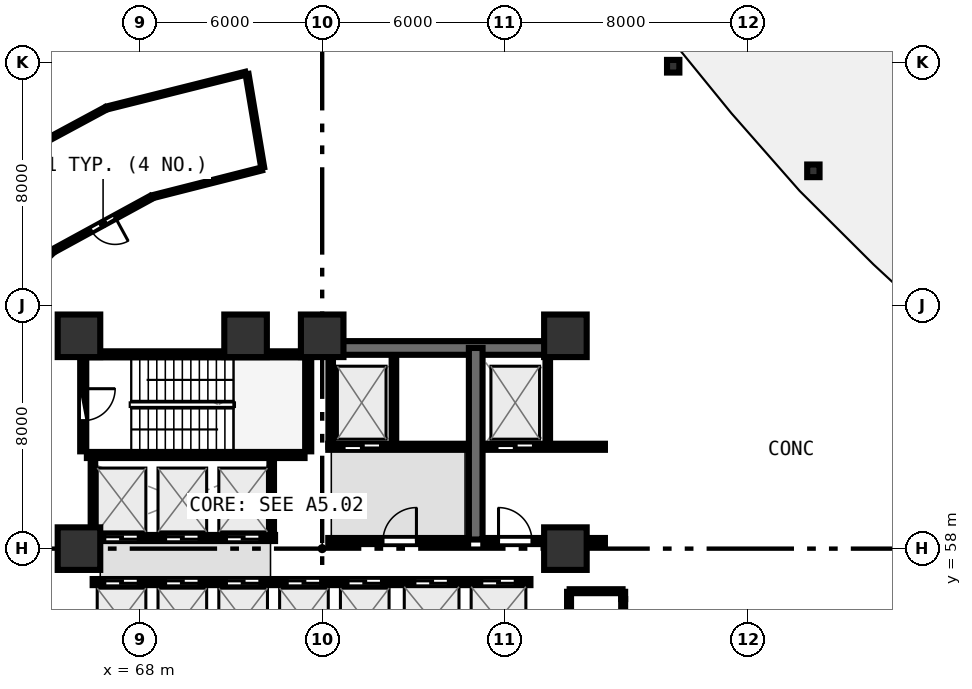
"""IFC4 building model, lengths in metres.
Left out: names, types, materials, properties, quantities, classifications, styles, units other than length and angle.
Written with IfcOpenShell. Run it as: python <this file> out.ifc"""

import sys

from ifc_helpers import new_model, si_unit, direction, frame, frame_2d, origin, origin_2d, place, context, subcontext, project, spatial, rectangle, i_section, extrude, element, fill, save


model = new_model("IFC4")
c1 = context("Model", 3, precision=1e-05, world=origin(), true_north=direction((0.0, 1.0)))
c2 = subcontext(c1, "Body", "Model", "MODEL_VIEW")
j1 = project(units=[si_unit("LENGTHUNIT", "METRE"), si_unit("PLANEANGLEUNIT", "RADIAN")], contexts=[c1])
p1 = place(None, origin())
s1 = spatial("IfcSite", under=j1, at=p1, CompositionType="ELEMENT")
p2 = place(p1, origin())
s2 = spatial("IfcBuilding", under=s1, at=p2, CompositionType="ELEMENT")
p3 = place(p2, origin())
s3 = spatial("IfcBuildingStorey", under=s2, at=p3, CompositionType="ELEMENT", Elevation=0.0)
for number, where, z_axis, x_axis in (
    (1, (82.0, 58.0, 0.0), (0.0, 0.0, 1.0), (1.0, 0.0, 0.0)),
    (2, (82.0, 65.0, 0.0), (0.0, 0.0, 1.0), (1.0, 0.0, 0.0)),
    (3, (74.0, 65.0, 0.0), (0.0, 0.0, 1.0), (1.0, 0.0, 0.0)),
    (4, (71.48, 65.0, 0.0), (0.0, 0.0, 1.0), (1.0, 0.0, 0.0)),
    (5, (66.0, 65.0, 0.0), (0.0, 0.0, 1.0), (1.0, 0.0, 0.0)),
    (6, (66.0, 58.0, 0.0), (0.0, 0.0, 1.0), (1.0, 0.0, 0.0)),
):
    element("IfcColumn", number, at=place(p3, frame(where, z_axis=z_axis, x_axis=x_axis)), inside=s3, PredefinedType="PILASTER", context=c2, shape_type="SweptSolid", body=[
        extrude(rectangle(XDim=1.4, YDim=1.4, at=origin_2d()), origin(), (0.0, 0.0, 1.0), 4.5),
    ])
for number, where, z_axis, x_axis in (
    (7, (90.156, 70.426, 0.0), (0.0, 0.0, 1.0), (1.0, 0.0, 0.0)),
    (8, (85.546, 73.866, 0.0), (0.0, 0.0, 1.0), (1.0, 0.0, 0.0)),
):
    element("IfcColumn", number, at=place(p3, frame(where, z_axis=z_axis, x_axis=x_axis)), inside=s3, PredefinedType="COLUMN", context=c2, shape_type="SweptSolid", body=[
        extrude(i_section(OverallWidth=0.406, OverallDepth=0.416, WebThickness=0.029, FlangeThickness=0.048, FilletRadius=0.015, at=origin_2d()), origin(), (0.0, 0.0, 1.0), 4.5),
    ])
p4 = place(p3, frame((66.26, 61.08, 0.0), z_axis=(0.0, 0.0, 1.0), x_axis=(1.0, 0.0, 0.0)))
e9 = element("IfcWall", 9, at=p4, inside=s3, PredefinedType="SHEAR", context=c2, shape_type="SweptSolid", body=[
    extrude(rectangle(XDim=7.16, YDim=0.2, at=frame_2d((3.58, 0.0))), origin(), (0.0, 0.0, 1.0), 4.2),
])
p5 = place(p3, frame((73.54, 61.2, 0.0), z_axis=(0.0, 0.0, 1.0), x_axis=(0.0, 1.0, 0.0)))
e10 = element("IfcWall", 10, at=p5, inside=s3, PredefinedType="SHEAR", context=c2, shape_type="SweptSolid", body=[
    extrude(rectangle(XDim=3.07, YDim=0.2, at=frame_2d((1.535, 0.0))), origin(), (0.0, 0.0, 1.0), 4.2),
])
p6 = place(p3, frame((73.42, 64.39, 0.0), z_axis=(0.0, 0.0, 1.0), x_axis=(-1.0, 0.0, 0.0)))
e11 = element("IfcWall", 11, at=p6, inside=s3, PredefinedType="SHEAR", context=c2, shape_type="SweptSolid", body=[
    extrude(rectangle(XDim=7.16, YDim=0.2, at=frame_2d((3.58, 0.0))), origin(), (0.0, 0.0, 1.0), 4.2),
])
p7 = place(p3, frame((66.14, 64.27, 0.0), z_axis=(0.0, 0.0, 1.0), x_axis=(0.0, -1.0, 0.0)))
e12 = element("IfcWall", 12, at=p7, inside=s3, PredefinedType="SHEAR", context=c2, shape_type="SweptSolid", body=[
    extrude(rectangle(XDim=3.07, YDim=0.2, at=frame_2d((1.535, 0.0))), origin(), (0.0, 0.0, 1.0), 4.2),
])
p8 = place(p7, frame((1.01, 0.0, 0.0)))
e13 = element("IfcOpeningElement", 13, at=p8, cuts=e12, PredefinedType="OPENING", context=c2, shape_type="SweptSolid", body=[
    extrude(rectangle(XDim=1.05, YDim=2.1, at=frame_2d((0.525, 1.05))), frame((0.0, 0.11, 0.0), z_axis=(0.0, -1.0, 0.0), x_axis=(1.0, 0.0, 0.0)), (0.0, 0.0, 1.0), 0.22),
])
p9 = place(p3, frame((74.0, 64.6, 0.0), z_axis=(0.0, 0.0, 1.0), x_axis=(1.0, 0.0, 0.0)))
e14 = element("IfcWall", 14, at=p9, inside=s3, PredefinedType="SHEAR", context=c2, shape_type="SweptSolid", body=[
    extrude(rectangle(XDim=8.0, YDim=0.45, at=frame_2d((4.0, 0.0))), origin(), (0.0, 0.0, 1.0), 4.2),
])
p10 = place(p3, frame((79.05, 58.3, 0.0), z_axis=(0.0, 0.0, 1.0), x_axis=(0.0, 1.0, 0.0)))
e15 = element("IfcWall", 15, at=p10, inside=s3, PredefinedType="SHEAR", context=c2, shape_type="SweptSolid", body=[
    extrude(rectangle(XDim=6.3, YDim=0.45, at=frame_2d((3.15, 0.0))), origin(), (0.0, 0.0, 1.0), 4.2),
])
p11 = place(p3, frame((74.2, 61.35, 0.0), z_axis=(0.0, 0.0, 1.0), x_axis=(1.0, 0.0, 0.0)))
e16 = element("IfcWall", 16, at=p11, inside=s3, PredefinedType="SOLIDWALL", context=c2, shape_type="SweptSolid", body=[
    extrude(rectangle(XDim=4.6, YDim=0.2, at=frame_2d((2.3, 0.0))), origin(), (0.0, 0.0, 1.0), 4.19),
])
p12 = place(p11, frame((0.52, 0.0, 0.0)))
e17 = element("IfcOpeningElement", 17, at=p12, cuts=e16, PredefinedType="OPENING", context=c2, shape_type="SweptSolid", body=[
    extrude(rectangle(XDim=1.2, YDim=2.15, at=frame_2d((0.6, 1.075))), frame((0.0, 0.11, 0.0), z_axis=(0.0, -1.0, 0.0), x_axis=(1.0, 0.0, 0.0)), (0.0, 0.0, 1.0), 0.22),
])
p13 = place(p3, frame((74.28, 61.35, 0.0), z_axis=(0.0, 0.0, 1.0), x_axis=(0.0, 1.0, 0.0)))
e18 = element("IfcWall", 18, at=p13, inside=s3, PredefinedType="PARTITIONING", context=c2, shape_type="SweptSolid", body=[
    extrude(rectangle(XDim=2.97, YDim=0.15, at=frame_2d((1.485, 0.0))), origin(), (0.0, 0.0, 1.0), 4.19),
])
p14 = place(p3, frame((76.36, 61.48, 0.0), z_axis=(0.0, 0.0, 1.0), x_axis=(0.0, 1.0, 0.0)))
e19 = element("IfcWall", 19, at=p14, inside=s3, PredefinedType="PARTITIONING", context=c2, shape_type="SweptSolid", body=[
    extrude(rectangle(XDim=2.84, YDim=0.15, at=frame_2d((1.42, 0.0))), origin(), (0.0, 0.0, 1.0), 4.19),
])
p15 = place(p3, frame((79.3, 61.35, 0.0), z_axis=(0.0, 0.0, 1.0), x_axis=(1.0, 0.0, 0.0)))
e20 = element("IfcWall", 20, at=p15, inside=s3, PredefinedType="SOLIDWALL", context=c2, shape_type="SweptSolid", body=[
    extrude(rectangle(XDim=4.0, YDim=0.2, at=frame_2d((2.0, 0.0))), origin(), (0.0, 0.0, 1.0), 3.485),
])
p16 = place(p15, frame((0.45, 0.0, 0.0)))
e21 = element("IfcOpeningElement", 21, at=p16, cuts=e20, PredefinedType="OPENING", context=c2, shape_type="SweptSolid", body=[
    extrude(rectangle(XDim=1.2, YDim=2.15, at=frame_2d((0.6, 1.075))), frame((0.0, 0.11, 0.0), z_axis=(0.0, -1.0, 0.0), x_axis=(1.0, 0.0, 0.0)), (0.0, 0.0, 1.0), 0.22),
])
p17 = place(p3, frame((81.42, 61.48, 0.0), z_axis=(0.0, 0.0, 1.0), x_axis=(0.0, 1.0, 0.0)))
e22 = element("IfcWall", 22, at=p17, inside=s3, PredefinedType="PARTITIONING", context=c2, shape_type="SweptSolid", body=[
    extrude(rectangle(XDim=2.84, YDim=0.15, at=frame_2d((1.42, 0.0))), origin(), (0.0, 0.0, 1.0), 4.19),
])
p18 = place(p3, frame((74.2, 58.25, 0.0), z_axis=(0.0, 0.0, 1.0), x_axis=(1.0, 0.0, 0.0)))
e23 = element("IfcWall", 23, at=p18, inside=s3, PredefinedType="SOLIDWALL", context=c2, shape_type="SweptSolid", body=[
    extrude(rectangle(XDim=4.6, YDim=0.2, at=frame_2d((2.3, 0.0))), origin(), (0.0, 0.0, 1.0), 4.19),
])
p19 = place(p18, frame((1.8, 0.0, 0.0)))
e24 = element("IfcOpeningElement", 24, at=p19, cuts=e23, PredefinedType="OPENING", context=c2, shape_type="SweptSolid", body=[
    extrude(rectangle(XDim=1.1, YDim=2.1, at=frame_2d((0.55, 1.05))), frame((0.0, 0.11, 0.0), z_axis=(0.0, -1.0, 0.0), x_axis=(1.0, 0.0, 0.0)), (0.0, 0.0, 1.0), 0.22),
])
p20 = place(p3, frame((79.3, 58.25, 0.0), z_axis=(0.0, 0.0, 1.0), x_axis=(1.0, 0.0, 0.0)))
e25 = element("IfcWall", 25, at=p20, inside=s3, PredefinedType="SOLIDWALL", context=c2, shape_type="SweptSolid", body=[
    extrude(rectangle(XDim=4.0, YDim=0.2, at=frame_2d((2.0, 0.0))), origin(), (0.0, 0.0, 1.0), 3.485),
])
p21 = place(p20, frame((0.5, 0.0, 0.0)))
e26 = element("IfcOpeningElement", 26, at=p21, cuts=e25, PredefinedType="OPENING", context=c2, shape_type="SweptSolid", body=[
    extrude(rectangle(XDim=1.1, YDim=2.1, at=frame_2d((0.55, 1.05))), frame((0.0, 0.11, 0.0), z_axis=(0.0, -1.0, 0.0), x_axis=(1.0, 0.0, 0.0)), (0.0, 0.0, 1.0), 0.22),
])
p22 = place(p3, frame((66.45, 58.35, 0.0), z_axis=(0.0, 0.0, 1.0), x_axis=(1.0, 0.0, 0.0)))
e27 = element("IfcWall", 27, at=p22, inside=s3, PredefinedType="SOLIDWALL", context=c2, shape_type="SweptSolid", body=[
    extrude(rectangle(XDim=6.0, YDim=0.2, at=frame_2d((3.0, 0.0))), origin(), (0.0, 0.0, 1.0), 4.19),
])
p23 = place(p22, frame((0.4, 0.0, 0.0)))
e28 = element("IfcOpeningElement", 28, at=p23, cuts=e27, PredefinedType="OPENING", context=c2, shape_type="SweptSolid", body=[
    extrude(rectangle(XDim=1.1, YDim=2.1, at=frame_2d((0.55, 1.05))), frame((0.0, 0.11, 0.0), z_axis=(0.0, -1.0, 0.0), x_axis=(1.0, 0.0, 0.0)), (0.0, 0.0, 1.0), 0.22),
])
p24 = place(p22, frame((2.4, 0.0, 0.0)))
e29 = element("IfcOpeningElement", 29, at=p24, cuts=e27, PredefinedType="OPENING", context=c2, shape_type="SweptSolid", body=[
    extrude(rectangle(XDim=1.1, YDim=2.1, at=frame_2d((0.55, 1.05))), frame((0.0, 0.11, 0.0), z_axis=(0.0, -1.0, 0.0), x_axis=(1.0, 0.0, 0.0)), (0.0, 0.0, 1.0), 0.22),
])
p25 = place(p22, frame((4.4, 0.0, 0.0)))
e30 = element("IfcOpeningElement", 30, at=p25, cuts=e27, PredefinedType="OPENING", context=c2, shape_type="SweptSolid", body=[
    extrude(rectangle(XDim=1.1, YDim=2.1, at=frame_2d((0.55, 1.05))), frame((0.0, 0.11, 0.0), z_axis=(0.0, -1.0, 0.0), x_axis=(1.0, 0.0, 0.0)), (0.0, 0.0, 1.0), 0.22),
])
for number, where, z_axis, x_axis in (
    (31, (66.46, 58.48, 0.0), (0.0, 0.0, 1.0), (0.0, 1.0, 0.0)),
    (32, (72.34, 58.48, 0.0), (0.0, 0.0, 1.0), (0.0, 1.0, 0.0)),
):
    element("IfcWall", number, at=place(p3, frame(where, z_axis=z_axis, x_axis=x_axis)), inside=s3, PredefinedType="PARTITIONING", context=c2, shape_type="SweptSolid", body=[
        extrude(rectangle(XDim=2.46, YDim=0.15, at=frame_2d((1.23, 0.0))), origin(), (0.0, 0.0, 1.0), 4.19),
    ])
p26 = place(p3, frame((66.45, 56.9, 0.0), z_axis=(0.0, 0.0, 1.0), x_axis=(1.0, 0.0, 0.0)))
e33 = element("IfcWall", 33, at=p26, inside=s3, PredefinedType="SOLIDWALL", context=c2, shape_type="SweptSolid", body=[
    extrude(rectangle(XDim=14.4, YDim=0.2, at=frame_2d((7.2, 0.0))), origin(), (0.0, 0.0, 1.0), 4.19),
])
p27 = place(p26, frame((0.4, 0.0, 0.0)))
e34 = element("IfcOpeningElement", 34, at=p27, cuts=e33, PredefinedType="OPENING", context=c2, shape_type="SweptSolid", body=[
    extrude(rectangle(XDim=1.1, YDim=2.1, at=frame_2d((0.55, 1.05))), frame((0.0, 0.11, 0.0), z_axis=(0.0, -1.0, 0.0), x_axis=(1.0, 0.0, 0.0)), (0.0, 0.0, 1.0), 0.22),
])
p28 = place(p26, frame((2.4, 0.0, 0.0)))
e35 = element("IfcOpeningElement", 35, at=p28, cuts=e33, PredefinedType="OPENING", context=c2, shape_type="SweptSolid", body=[
    extrude(rectangle(XDim=1.1, YDim=2.1, at=frame_2d((0.55, 1.05))), frame((0.0, 0.11, 0.0), z_axis=(0.0, -1.0, 0.0), x_axis=(1.0, 0.0, 0.0)), (0.0, 0.0, 1.0), 0.22),
])
p29 = place(p26, frame((4.4, 0.0, 0.0)))
e36 = element("IfcOpeningElement", 36, at=p29, cuts=e33, PredefinedType="OPENING", context=c2, shape_type="SweptSolid", body=[
    extrude(rectangle(XDim=1.1, YDim=2.1, at=frame_2d((0.55, 1.05))), frame((0.0, 0.11, 0.0), z_axis=(0.0, -1.0, 0.0), x_axis=(1.0, 0.0, 0.0)), (0.0, 0.0, 1.0), 0.22),
])
p30 = place(p26, frame((6.4, 0.0, 0.0)))
e37 = element("IfcOpeningElement", 37, at=p30, cuts=e33, PredefinedType="OPENING", context=c2, shape_type="SweptSolid", body=[
    extrude(rectangle(XDim=1.1, YDim=2.1, at=frame_2d((0.55, 1.05))), frame((0.0, 0.11, 0.0), z_axis=(0.0, -1.0, 0.0), x_axis=(1.0, 0.0, 0.0)), (0.0, 0.0, 1.0), 0.22),
])
p31 = place(p26, frame((8.4, 0.0, 0.0)))
e38 = element("IfcOpeningElement", 38, at=p31, cuts=e33, PredefinedType="OPENING", context=c2, shape_type="SweptSolid", body=[
    extrude(rectangle(XDim=1.1, YDim=2.1, at=frame_2d((0.55, 1.05))), frame((0.0, 0.11, 0.0), z_axis=(0.0, -1.0, 0.0), x_axis=(1.0, 0.0, 0.0)), (0.0, 0.0, 1.0), 0.22),
])
p32 = place(p26, frame((10.6, 0.0, 0.0)))
e39 = element("IfcOpeningElement", 39, at=p32, cuts=e33, PredefinedType="OPENING", context=c2, shape_type="SweptSolid", body=[
    extrude(rectangle(XDim=1.1, YDim=2.1, at=frame_2d((0.55, 1.05))), frame((0.0, 0.11, 0.0), z_axis=(0.0, -1.0, 0.0), x_axis=(1.0, 0.0, 0.0)), (0.0, 0.0, 1.0), 0.22),
])
p33 = place(p26, frame((12.8, 0.0, 0.0)))
e40 = element("IfcOpeningElement", 40, at=p33, cuts=e33, PredefinedType="OPENING", context=c2, shape_type="SweptSolid", body=[
    extrude(rectangle(XDim=1.1, YDim=2.1, at=frame_2d((0.55, 1.05))), frame((0.0, 0.11, 0.0), z_axis=(0.0, -1.0, 0.0), x_axis=(1.0, 0.0, 0.0)), (0.0, 0.0, 1.0), 0.22),
])
p34 = place(p3, frame((83.9, 52.46, 0.0), z_axis=(0.0, 0.0, 1.0), x_axis=(0.0, 1.0, 0.0)))
e41 = element("IfcWall", 41, at=p34, inside=s3, PredefinedType="PLUMBINGWALL", context=c2, shape_type="SweptSolid", body=[
    extrude(rectangle(XDim=3.88, YDim=0.13, at=frame_2d((1.94, 0.0))), origin(), (0.0, 0.0, 1.0), 4.19),
])
p35 = place(p34, frame((1.51, 0.0, 0.0)))
e42 = element("IfcOpeningElement", 42, at=p35, cuts=e41, PredefinedType="OPENING", context=c2, shape_type="SweptSolid", body=[
    extrude(rectangle(XDim=0.86, YDim=2.05, at=frame_2d((0.43, 1.025))), frame((0.0, 0.075, 0.0), z_axis=(0.0, -1.0, 0.0), x_axis=(1.0, 0.0, 0.0)), (0.0, 0.0, 1.0), 0.15),
])
p36 = place(p3, frame((68.357, 69.544, 0.0), z_axis=(0.0, 0.0, 1.0), x_axis=(-0.877746280932, -0.479125731212, 0.0)))
e43 = element("IfcWall", 43, at=p36, inside=s3, PredefinedType="PARTITIONING", context=c2, shape_type="SweptSolid", body=[
    extrude(rectangle(XDim=3.563, YDim=0.12, at=frame_2d((1.782, 0.0))), origin(), (0.0, 0.0, 1.0), 4.19),
])
p37 = place(p36, frame((1.332, 0.0, 0.0)))
e44 = element("IfcOpeningElement", 44, at=p37, cuts=e43, PredefinedType="OPENING", context=c2, shape_type="SweptSolid", body=[
    extrude(rectangle(XDim=0.9, YDim=2.08, at=frame_2d((0.45, 1.04))), frame((0.0, 0.07, 0.0), z_axis=(0.0, -1.0, 0.0), x_axis=(1.0, 0.0, 0.0)), (0.0, 0.0, 1.0), 0.14),
])
p38 = place(p3, frame((83.9, 56.34, 0.0), z_axis=(0.0, 0.0, 1.0), x_axis=(0.0, 1.0, 0.0)))
e45 = element("IfcWall", 45, at=p38, inside=s3, PredefinedType="PLUMBINGWALL", context=c2, shape_type="SweptSolid", body=[
    extrude(rectangle(XDim=0.24, YDim=0.13, at=frame_2d((0.12, 0.0))), origin(), (0.0, 0.0, 1.0), 4.19),
])
p39 = place(p3, frame((83.88, 56.6, 0.0), z_axis=(0.0, 0.0, 1.0), x_axis=(-1.0, 0.0, 0.0)))
e46 = element("IfcWall", 46, at=p39, inside=s3, PredefinedType="PLUMBINGWALL", context=c2, shape_type="SweptSolid", body=[
    extrude(rectangle(XDim=1.74, YDim=0.13, at=frame_2d((0.87, 0.0))), origin(), (0.0, 0.0, 1.0), 3.485),
])
p40 = place(p3, frame((82.12, 56.58, 0.0), z_axis=(0.0, 0.0, 1.0), x_axis=(0.0, -1.0, 0.0)))
e47 = element("IfcWall", 47, at=p40, inside=s3, PredefinedType="PLUMBINGWALL", context=c2, shape_type="SweptSolid", body=[
    extrude(rectangle(XDim=2.31, YDim=0.13, at=frame_2d((1.155, 0.0))), origin(), (0.0, 0.0, 1.0), 3.485),
])
p41 = place(p3, frame((72.01, 70.487, 0.0), z_axis=(0.0, 0.0, 1.0), x_axis=(-0.969229007952, -0.246160781085, 0.0)))
e48 = element("IfcWall", 48, at=p41, inside=s3, PredefinedType="PARTITIONING", context=c2, shape_type="SweptSolid", body=[
    extrude(rectangle(XDim=3.675, YDim=0.1, at=frame_2d((1.837, 0.0))), origin(), (0.0, 0.0, 1.0), 3.585),
])
p42 = place(p3, frame((65.148, 67.78, 0.0), z_axis=(0.0, 0.0, 1.0), x_axis=(-0.722428617801, -0.691445509192, 0.0)))
e49 = element("IfcWall", 49, at=p42, inside=s3, PredefinedType="PARTITIONING", context=c2, shape_type="SweptSolid", body=[
    extrude(rectangle(XDim=3.507, YDim=0.1, at=frame_2d((1.753, 0.0))), origin(), (0.0, 0.0, 1.0), 3.585),
])
p43 = place(p3, frame((62.833, 70.298, 0.0), z_axis=(0.0, 0.0, 1.0), x_axis=(0.880380395475, 0.474268235562, 0.0)))
e50 = element("IfcWall", 50, at=p43, inside=s3, PredefinedType="PARTITIONING", context=c2, shape_type="SweptSolid", body=[
    extrude(rectangle(XDim=4.582, YDim=0.1, at=frame_2d((2.291, 0.0))), origin(), (0.0, 0.0, 1.0), 3.585),
])
p44 = place(p3, frame((66.941, 72.5, 0.0), z_axis=(0.0, 0.0, 1.0), x_axis=(0.970108758835, 0.242670550399, 0.0)))
e51 = element("IfcWall", 51, at=p44, inside=s3, PredefinedType="PARTITIONING", context=c2, shape_type="SweptSolid", body=[
    extrude(rectangle(XDim=4.683, YDim=0.1, at=frame_2d((2.342, 0.0))), origin(), (0.0, 0.0, 1.0), 3.585),
])
p45 = place(p3, frame((71.53, 73.606, 0.0), z_axis=(0.0, 0.0, 1.0), x_axis=(0.164806022155, -0.98632599837, 0.0)))
e52 = element("IfcWall", 52, at=p45, inside=s3, PredefinedType="PARTITIONING", context=c2, shape_type="SweptSolid", body=[
    extrude(rectangle(XDim=3.112, YDim=0.1, at=frame_2d((1.556, 0.0))), origin(), (0.0, 0.0, 1.0), 3.945),
])
p46 = place(p8, origin())
e53 = element("IfcDoor", 53, at=p46, inside=s3, OperationType="SINGLE_SWING_LEFT", PredefinedType="DOOR", context=c2, shape_type="SweptSolid", body=[
    extrude(rectangle(XDim=1.05, YDim=2.1, at=frame_2d((0.525, 1.05))), frame((0.0, 0.025, 0.0), z_axis=(0.0, -1.0, 0.0), x_axis=(1.0, 0.0, 0.0)), (0.0, 0.0, 1.0), 0.05),
])
fill(e13, e53)
p47 = place(p12, origin())
e54 = element("IfcDoor", 54, at=p47, inside=s3, OperationType="DOUBLE_DOOR_SLIDING", PredefinedType="DOOR", context=c2, shape_type="SweptSolid", body=[
    extrude(rectangle(XDim=1.2, YDim=2.15, at=frame_2d((0.6, 1.075))), frame((0.0, 0.025, 0.0), z_axis=(0.0, -1.0, 0.0), x_axis=(1.0, 0.0, 0.0)), (0.0, 0.0, 1.0), 0.05),
])
fill(e17, e54)
p48 = place(p16, origin())
e55 = element("IfcDoor", 55, at=p48, inside=s3, OperationType="DOUBLE_DOOR_SLIDING", PredefinedType="DOOR", context=c2, shape_type="SweptSolid", body=[
    extrude(rectangle(XDim=1.2, YDim=2.15, at=frame_2d((0.6, 1.075))), frame((0.0, 0.025, 0.0), z_axis=(0.0, -1.0, 0.0), x_axis=(1.0, 0.0, 0.0)), (0.0, 0.0, 1.0), 0.05),
])
fill(e21, e55)
p49 = place(p19, frame((1.1, 0.0, 0.0), z_axis=(0.0, 0.0, 1.0), x_axis=(-1.0, 0.0, 0.0)))
e56 = element("IfcDoor", 56, at=p49, inside=s3, OperationType="SINGLE_SWING_LEFT", PredefinedType="DOOR", context=c2, shape_type="SweptSolid", body=[
    extrude(rectangle(XDim=1.1, YDim=2.1, at=frame_2d((0.55, 1.05))), frame((0.0, 0.025, 0.0), z_axis=(0.0, -1.0, 0.0), x_axis=(1.0, 0.0, 0.0)), (0.0, 0.0, 1.0), 0.05),
])
fill(e24, e56)
p50 = place(p21, frame((1.1, 0.0, 0.0), z_axis=(0.0, 0.0, 1.0), x_axis=(-1.0, 0.0, 0.0)))
e57 = element("IfcDoor", 57, at=p50, inside=s3, OperationType="SINGLE_SWING_RIGHT", PredefinedType="DOOR", context=c2, shape_type="SweptSolid", body=[
    extrude(rectangle(XDim=1.1, YDim=2.1, at=frame_2d((0.55, 1.05))), frame((0.0, 0.025, 0.0), z_axis=(0.0, -1.0, 0.0), x_axis=(1.0, 0.0, 0.0)), (0.0, 0.0, 1.0), 0.05),
])
fill(e26, e57)
p51 = place(p23, origin())
e58 = element("IfcDoor", 58, at=p51, inside=s3, OperationType="DOUBLE_DOOR_SLIDING", PredefinedType="DOOR", context=c2, shape_type="SweptSolid", body=[
    extrude(rectangle(XDim=1.1, YDim=2.1, at=frame_2d((0.55, 1.05))), frame((0.0, 0.025, 0.0), z_axis=(0.0, -1.0, 0.0), x_axis=(1.0, 0.0, 0.0)), (0.0, 0.0, 1.0), 0.05),
])
fill(e28, e58)
p52 = place(p24, origin())
e59 = element("IfcDoor", 59, at=p52, inside=s3, OperationType="DOUBLE_DOOR_SLIDING", PredefinedType="DOOR", context=c2, shape_type="SweptSolid", body=[
    extrude(rectangle(XDim=1.1, YDim=2.1, at=frame_2d((0.55, 1.05))), frame((0.0, 0.025, 0.0), z_axis=(0.0, -1.0, 0.0), x_axis=(1.0, 0.0, 0.0)), (0.0, 0.0, 1.0), 0.05),
])
fill(e29, e59)
p53 = place(p25, origin())
e60 = element("IfcDoor", 60, at=p53, inside=s3, OperationType="DOUBLE_DOOR_SLIDING", PredefinedType="DOOR", context=c2, shape_type="SweptSolid", body=[
    extrude(rectangle(XDim=1.1, YDim=2.1, at=frame_2d((0.55, 1.05))), frame((0.0, 0.025, 0.0), z_axis=(0.0, -1.0, 0.0), x_axis=(1.0, 0.0, 0.0)), (0.0, 0.0, 1.0), 0.05),
])
fill(e30, e60)
p54 = place(p27, origin())
e61 = element("IfcDoor", 61, at=p54, inside=s3, OperationType="DOUBLE_DOOR_SLIDING", PredefinedType="DOOR", context=c2, shape_type="SweptSolid", body=[
    extrude(rectangle(XDim=1.1, YDim=2.1, at=frame_2d((0.55, 1.05))), frame((0.0, 0.025, 0.0), z_axis=(0.0, -1.0, 0.0), x_axis=(1.0, 0.0, 0.0)), (0.0, 0.0, 1.0), 0.05),
])
fill(e34, e61)
p55 = place(p28, origin())
e62 = element("IfcDoor", 62, at=p55, inside=s3, OperationType="DOUBLE_DOOR_SLIDING", PredefinedType="DOOR", context=c2, shape_type="SweptSolid", body=[
    extrude(rectangle(XDim=1.1, YDim=2.1, at=frame_2d((0.55, 1.05))), frame((0.0, 0.025, 0.0), z_axis=(0.0, -1.0, 0.0), x_axis=(1.0, 0.0, 0.0)), (0.0, 0.0, 1.0), 0.05),
])
fill(e35, e62)
p56 = place(p29, origin())
e63 = element("IfcDoor", 63, at=p56, inside=s3, OperationType="DOUBLE_DOOR_SLIDING", PredefinedType="DOOR", context=c2, shape_type="SweptSolid", body=[
    extrude(rectangle(XDim=1.1, YDim=2.1, at=frame_2d((0.55, 1.05))), frame((0.0, 0.025, 0.0), z_axis=(0.0, -1.0, 0.0), x_axis=(1.0, 0.0, 0.0)), (0.0, 0.0, 1.0), 0.05),
])
fill(e36, e63)
p57 = place(p30, origin())
e64 = element("IfcDoor", 64, at=p57, inside=s3, OperationType="DOUBLE_DOOR_SLIDING", PredefinedType="DOOR", context=c2, shape_type="SweptSolid", body=[
    extrude(rectangle(XDim=1.1, YDim=2.1, at=frame_2d((0.55, 1.05))), frame((0.0, 0.025, 0.0), z_axis=(0.0, -1.0, 0.0), x_axis=(1.0, 0.0, 0.0)), (0.0, 0.0, 1.0), 0.05),
])
fill(e37, e64)
p58 = place(p31, origin())
e65 = element("IfcDoor", 65, at=p58, inside=s3, OperationType="DOUBLE_DOOR_SLIDING", PredefinedType="DOOR", context=c2, shape_type="SweptSolid", body=[
    extrude(rectangle(XDim=1.1, YDim=2.1, at=frame_2d((0.55, 1.05))), frame((0.0, 0.025, 0.0), z_axis=(0.0, -1.0, 0.0), x_axis=(1.0, 0.0, 0.0)), (0.0, 0.0, 1.0), 0.05),
])
fill(e38, e65)
p59 = place(p32, origin())
e66 = element("IfcDoor", 66, at=p59, inside=s3, OperationType="DOUBLE_DOOR_SLIDING", PredefinedType="DOOR", context=c2, shape_type="SweptSolid", body=[
    extrude(rectangle(XDim=1.1, YDim=2.1, at=frame_2d((0.55, 1.05))), frame((0.0, 0.025, 0.0), z_axis=(0.0, -1.0, 0.0), x_axis=(1.0, 0.0, 0.0)), (0.0, 0.0, 1.0), 0.05),
])
fill(e39, e66)
p60 = place(p33, origin())
e67 = element("IfcDoor", 67, at=p60, inside=s3, OperationType="DOUBLE_DOOR_SLIDING", PredefinedType="DOOR", context=c2, shape_type="SweptSolid", body=[
    extrude(rectangle(XDim=1.1, YDim=2.1, at=frame_2d((0.55, 1.05))), frame((0.0, 0.025, 0.0), z_axis=(0.0, -1.0, 0.0), x_axis=(1.0, 0.0, 0.0)), (0.0, 0.0, 1.0), 0.05),
])
fill(e40, e67)
p61 = place(p37, origin())
e68 = element("IfcDoor", 68, at=p61, inside=s3, OperationType="SINGLE_SWING_LEFT", PredefinedType="DOOR", context=c2, shape_type="SweptSolid", body=[
    extrude(rectangle(XDim=0.9, YDim=2.08, at=frame_2d((0.45, 1.04))), frame((0.0, 0.025, 0.0), z_axis=(0.0, -1.0, 0.0), x_axis=(1.0, 0.0, 0.0)), (0.0, 0.0, 1.0), 0.05),
])
fill(e44, e68)
save(model, sys.argv[1])
